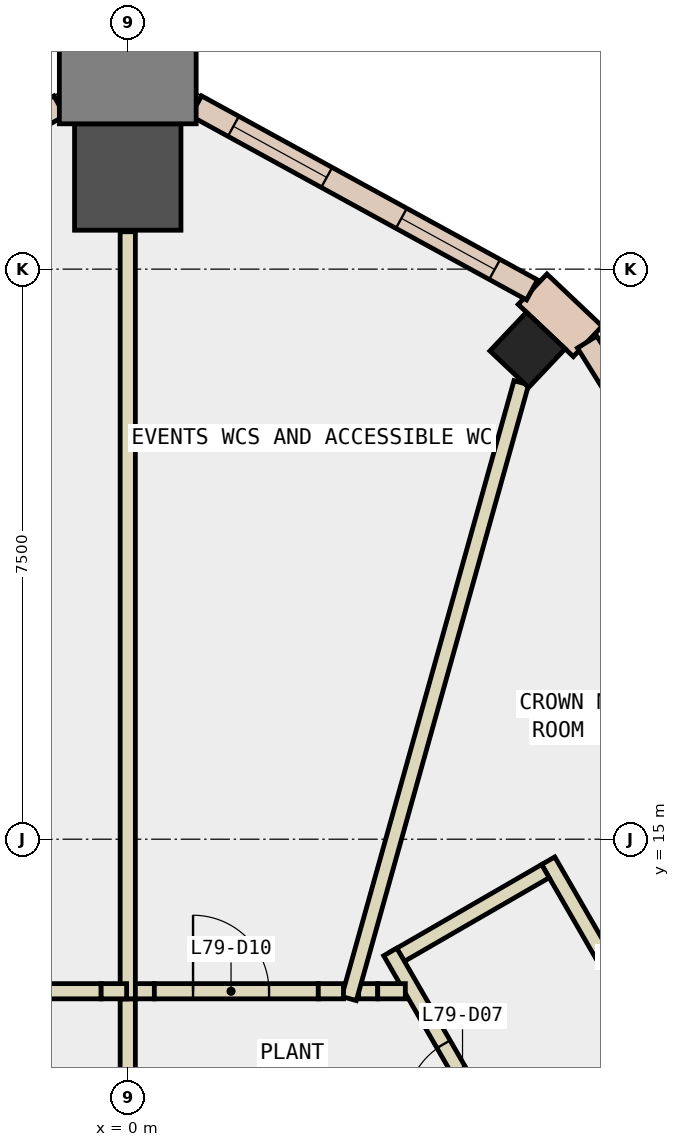
"""IFC4 building model, lengths in metres.
Left out: names, types, materials, properties, quantities, classifications, styles, units other than length and angle.
Written with IfcOpenShell. Run it as: python <this file> out.ifc"""

import sys

from ifc_helpers import new_model, si_unit, direction, frame, frame_2d, origin, origin_2d, place, context, subcontext, project, spatial, rectangle, extrude, element, fill, save


model = new_model("IFC4")
c1 = context("Model", 3, precision=1e-05, world=origin(), true_north=direction((0.0, 1.0)))
c2 = subcontext(c1, "Body", "Model", "MODEL_VIEW")
j1 = project(units=[si_unit("LENGTHUNIT", "METRE"), si_unit("PLANEANGLEUNIT", "RADIAN")], contexts=[c1])
p1 = place(None, origin())
s1 = spatial("IfcSite", under=j1, at=p1, CompositionType="ELEMENT")
p2 = place(p1, origin())
s2 = spatial("IfcBuilding", under=s1, at=p2, CompositionType="ELEMENT")
p3 = place(p2, frame((0.0, 0.0, 335.9)))
s3 = spatial("IfcBuildingStorey", under=s2, at=p3, CompositionType="ELEMENT", Elevation=335.9)
p4 = place(p3, frame((5.26, 21.438, -0.35), z_axis=(0.0, 0.0, 1.0), x_axis=(-0.726658609123, 0.686998737835, 0.0)))
e1 = element("IfcColumn", 1, at=p4, inside=s3, PredefinedType="COLUMN", context=c2, shape_type="SweptSolid", body=[
    extrude(rectangle(XDim=0.7, YDim=0.7, at=origin_2d()), origin(), (0.0, 0.0, 1.0), 4.4),
])
p5 = place(p3, frame((0.0, 23.712, -0.35), z_axis=(0.0, 0.0, 1.0), x_axis=(0.0, 1.0, 0.0)))
e2 = element("IfcColumn", 2, at=p5, inside=s3, PredefinedType="COLUMN", context=c2, shape_type="SweptSolid", body=[
    extrude(rectangle(XDim=1.4, YDim=1.4, at=origin_2d()), origin(), (0.0, 0.0, 1.0), 4.4),
])
p6 = place(p3, frame((0.0, 25.312, -0.35), z_axis=(0.0, 0.0, 1.0), x_axis=(0.0, 1.0, 0.0)))
e3 = element("IfcColumn", 3, at=p6, inside=s3, PredefinedType="COLUMN", context=c2, shape_type="SweptSolid", body=[
    extrude(rectangle(XDim=1.8, YDim=1.8, at=origin_2d()), origin(), (0.0, 0.0, 1.0), 4.4),
])
p7 = place(p3, frame((6.052, 21.549, 0.0), z_axis=(0.0, 0.0, 1.0), x_axis=(-0.726376136967, 0.687297393888, 0.0)))
e4 = element("IfcWall", 4, at=p7, inside=s3, PredefinedType="STANDARD", context=c2, shape_type="SweptSolid", body=[
    extrude(rectangle(XDim=1.0, YDim=0.55, at=frame_2d((0.5, 0.0))), origin(), (0.0, 0.0, 1.0), 4.05),
])
p8 = place(p3, frame((9.769, 15.564, 0.0), z_axis=(0.0, 0.0, 1.0), x_axis=(-0.528920387505, 0.848671446251, 0.0)))
e5 = element("IfcWall", 5, at=p8, inside=s3, PredefinedType="STANDARD", context=c2, shape_type="SweptSolid", body=[
    extrude(rectangle(XDim=7.043, YDim=0.3, at=frame_2d((3.521, 0.0))), origin(), (0.0, 0.0, 1.0), 4.05),
])
p9 = place(p8, frame((0.561, 0.0, 0.9)))
e6 = element("IfcOpeningElement", 6, at=p9, cuts=e5, PredefinedType="OPENING", context=c2, shape_type="SweptSolid", body=[
    extrude(rectangle(XDim=2.4, YDim=3.0, at=frame_2d((1.2, 1.5))), frame((0.0, 0.16, 0.0), z_axis=(0.0, -1.0, 0.0), x_axis=(1.0, 0.0, 0.0)), (0.0, 0.0, 1.0), 0.32),
])
p10 = place(p8, frame((4.082, 0.0, 0.9)))
e7 = element("IfcOpeningElement", 7, at=p10, cuts=e5, PredefinedType="OPENING", context=c2, shape_type="SweptSolid", body=[
    extrude(rectangle(XDim=2.4, YDim=3.0, at=frame_2d((1.2, 1.5))), frame((0.0, 0.16, 0.0), z_axis=(0.0, -1.0, 0.0), x_axis=(1.0, 0.0, 0.0)), (0.0, 0.0, 1.0), 0.32),
])
p11 = place(p3, frame((5.319, 22.227, 0.0), z_axis=(0.0, 0.0, 1.0), x_axis=(-0.877068569324, 0.480365199305, 0.0)))
e8 = element("IfcWall", 8, at=p11, inside=s3, PredefinedType="STANDARD", context=c2, shape_type="SweptSolid", body=[
    extrude(rectangle(XDim=5.04, YDim=0.3, at=frame_2d((2.52, 0.0))), origin(), (0.0, 0.0, 1.0), 4.05),
])
p12 = place(p11, frame((0.56, 0.0, 0.9)))
e9 = element("IfcOpeningElement", 9, at=p12, cuts=e8, PredefinedType="OPENING", context=c2, shape_type="SweptSolid", body=[
    extrude(rectangle(XDim=1.4, YDim=3.0, at=frame_2d((0.7, 1.5))), frame((0.0, 0.16, 0.0), z_axis=(0.0, -1.0, 0.0), x_axis=(1.0, 0.0, 0.0)), (0.0, 0.0, 1.0), 0.32),
])
p13 = place(p11, frame((3.08, 0.0, 0.9)))
e10 = element("IfcOpeningElement", 10, at=p13, cuts=e8, PredefinedType="OPENING", context=c2, shape_type="SweptSolid", body=[
    extrude(rectangle(XDim=1.4, YDim=3.0, at=frame_2d((0.7, 1.5))), frame((0.0, 0.16, 0.0), z_axis=(0.0, -1.0, 0.0), x_axis=(1.0, 0.0, 0.0)), (0.0, 0.0, 1.0), 0.32),
])
p14 = place(p3, frame((-0.899, 24.648, 0.0), z_axis=(0.0, 0.0, 1.0), x_axis=(-0.877068569324, -0.480365199305, 0.0)))
e11 = element("IfcWall", 11, at=p14, inside=s3, PredefinedType="STANDARD", context=c2, shape_type="SweptSolid", body=[
    extrude(rectangle(XDim=5.04, YDim=0.3, at=frame_2d((2.52, 0.0))), origin(), (0.0, 0.0, 1.0), 4.05),
])
p15 = place(p14, frame((0.56, 0.0, 0.9)))
e12 = element("IfcOpeningElement", 12, at=p15, cuts=e11, PredefinedType="OPENING", context=c2, shape_type="SweptSolid", body=[
    extrude(rectangle(XDim=1.4, YDim=3.0, at=frame_2d((0.7, 1.5))), frame((0.0, 0.16, 0.0), z_axis=(0.0, -1.0, 0.0), x_axis=(1.0, 0.0, 0.0)), (0.0, 0.0, 1.0), 0.32),
])
p16 = place(p14, frame((3.08, 0.0, 0.9)))
e13 = element("IfcOpeningElement", 13, at=p16, cuts=e11, PredefinedType="OPENING", context=c2, shape_type="SweptSolid", body=[
    extrude(rectangle(XDim=1.4, YDim=3.0, at=frame_2d((0.7, 1.5))), frame((0.0, 0.16, 0.0), z_axis=(0.0, -1.0, 0.0), x_axis=(1.0, 0.0, 0.0)), (0.0, 0.0, 1.0), 0.32),
])
p17 = place(p3, frame((5.532, 14.717, 0.0), z_axis=(0.0, 0.0, 1.0), x_axis=(0.499955822529, -0.866050908157, 0.0)))
e14 = element("IfcWall", 14, at=p17, inside=s3, PredefinedType="PARTITIONING", context=c2, shape_type="SweptSolid", body=[
    extrude(rectangle(XDim=2.958, YDim=0.2, at=frame_2d((1.479, 0.0))), origin(), (0.0, 0.0, 1.0), 4.05),
])
p18 = place(p17, frame((1.88, 0.0, 0.0)))
e15 = element("IfcOpeningElement", 15, at=p18, cuts=e14, PredefinedType="OPENING", context=c2, shape_type="SweptSolid", body=[
    extrude(rectangle(XDim=1.0, YDim=2.1, at=frame_2d((0.5, 1.05))), frame((0.0, 0.11, 0.0), z_axis=(0.0, -1.0, 0.0), x_axis=(1.0, 0.0, 0.0)), (0.0, 0.0, 1.0), 0.22),
])
p19 = place(p3, frame((3.504, 13.43, 0.0), z_axis=(0.0, 0.0, 1.0), x_axis=(0.865927408828, 0.500169693844, 0.0)))
e16 = element("IfcWall", 16, at=p19, inside=s3, PredefinedType="PARTITIONING", context=c2, shape_type="SweptSolid", body=[
    extrude(rectangle(XDim=2.3, YDim=0.2, at=frame_2d((1.15, 0.0))), origin(), (0.0, 0.0, 1.0), 4.05),
])
p20 = place(p3, frame((3.038, 13.0, 0.0), z_axis=(0.0, 0.0, 1.0), x_axis=(1.0, 0.0, 0.0)))
e17 = element("IfcWall", 17, at=p20, inside=s3, PredefinedType="PARTITIONING", context=c2, shape_type="SweptSolid", body=[
    extrude(rectangle(XDim=0.251, YDim=0.2, at=frame_2d((0.125, 0.0))), origin(), (0.0, 0.0, 1.0), 1.95),
])
p21 = place(p3, frame((0.015, 13.0, 0.0), z_axis=(0.0, 0.0, 1.0), x_axis=(1.0, 0.0, 0.0)))
e18 = element("IfcWall", 18, at=p21, inside=s3, PredefinedType="PARTITIONING", context=c2, shape_type="SweptSolid", body=[
    extrude(rectangle(XDim=0.335, YDim=0.2, at=frame_2d((0.167, 0.0))), origin(), (0.0, 0.0, 1.0), 1.95),
])
p22 = place(p3, frame((0.0, 11.0, 0.0), z_axis=(0.0, 0.0, 1.0), x_axis=(0.0, 1.0, 0.0)))
e19 = element("IfcWall", 19, at=p22, inside=s3, PredefinedType="PARTITIONING", context=c2, shape_type="SweptSolid", body=[
    extrude(rectangle(XDim=1.9, YDim=0.2, at=frame_2d((0.95, 0.0))), origin(), (0.0, 0.0, 1.0), 1.95),
])
p23 = place(p3, frame((2.911, 12.904, 0.0), z_axis=(0.0, 0.0, 1.0), x_axis=(0.269466315524, 0.963009815525, 0.0)))
e20 = element("IfcWall", 20, at=p23, inside=s3, PredefinedType="PARTITIONING", context=c2, shape_type="SweptSolid", body=[
    extrude(rectangle(XDim=8.413, YDim=0.2, at=frame_2d((4.207, 0.0))), origin(), (0.0, 0.0, 1.0), 1.95),
])
p24 = place(p3, frame((0.0, 12.9, 0.0), z_axis=(0.0, 0.0, 1.0), x_axis=(0.0, 1.0, 0.0)))
e21 = element("IfcWall", 21, at=p24, inside=s3, PredefinedType="PARTITIONING", context=c2, shape_type="SweptSolid", body=[
    extrude(rectangle(XDim=10.092, YDim=0.2, at=frame_2d((5.046, 0.0))), origin(), (0.0, 0.0, 1.0), 1.95),
])
p25 = place(p3, frame((4.822, 11.147, 0.0), z_axis=(0.0, 0.0, 1.0), x_axis=(-0.499871764879, 0.866099427708, 0.0)))
e22 = element("IfcWall", 22, at=p25, inside=s3, PredefinedType="PARTITIONING", context=c2, shape_type="SweptSolid", body=[
    extrude(rectangle(XDim=2.737, YDim=0.2, at=frame_2d((1.368, 0.0))), origin(), (0.0, 0.0, 1.0), 4.05),
])
p26 = place(p25, frame((0.335, 0.0, 0.0)))
e23 = element("IfcOpeningElement", 23, at=p26, cuts=e22, PredefinedType="OPENING", context=c2, shape_type="SweptSolid", body=[
    extrude(rectangle(XDim=1.0, YDim=2.1, at=frame_2d((0.5, 1.05))), frame((0.0, 0.11, 0.0), z_axis=(0.0, -1.0, 0.0), x_axis=(1.0, 0.0, 0.0)), (0.0, 0.0, 1.0), 0.22),
])
p27 = place(p3, frame((3.289, 13.0, 0.0), z_axis=(0.0, 0.0, 1.0), x_axis=(1.0, 0.0, 0.0)))
e24 = element("IfcWall", 24, at=p27, inside=s3, PredefinedType="PARTITIONING", context=c2, shape_type="SweptSolid", body=[
    extrude(rectangle(XDim=0.363, YDim=0.2, at=frame_2d((0.182, 0.0))), origin(), (0.0, 0.0, 1.0), 4.05),
])
p28 = place(p3, frame((0.35, 13.0, 0.0), z_axis=(0.0, 0.0, 1.0), x_axis=(1.0, 0.0, 0.0)))
e25 = element("IfcWall", 25, at=p28, inside=s3, PredefinedType="PARTITIONING", context=c2, shape_type="SweptSolid", body=[
    extrude(rectangle(XDim=2.157, YDim=0.2, at=frame_2d((1.079, 0.0))), origin(), (0.0, 0.0, 1.0), 4.05),
])
p29 = place(p28, frame((0.509, 0.0, 0.0)))
e26 = element("IfcOpeningElement", 26, at=p29, cuts=e25, PredefinedType="OPENING", context=c2, shape_type="SweptSolid", body=[
    extrude(rectangle(XDim=1.0, YDim=2.1, at=frame_2d((0.5, 1.05))), frame((0.0, 0.11, 0.0), z_axis=(0.0, -1.0, 0.0), x_axis=(1.0, 0.0, 0.0)), (0.0, 0.0, 1.0), 0.22),
])
p30 = place(p3, frame((2.507, 13.0, 0.0), z_axis=(0.0, 0.0, 1.0), x_axis=(1.0, 0.0, 0.0)))
e27 = element("IfcWall", 27, at=p30, inside=s3, PredefinedType="PARTITIONING", context=c2, shape_type="SweptSolid", body=[
    extrude(rectangle(XDim=0.331, YDim=0.2, at=frame_2d((0.166, 0.0))), origin(), (0.0, 0.0, 1.0), 1.95),
])
p31 = place(p3, frame((-2.507, 13.0, 0.0), z_axis=(0.0, 0.0, 1.0), x_axis=(1.0, 0.0, 0.0)))
e28 = element("IfcWall", 28, at=p31, inside=s3, PredefinedType="PARTITIONING", context=c2, shape_type="SweptSolid", body=[
    extrude(rectangle(XDim=2.157, YDim=0.2, at=frame_2d((1.079, 0.0))), origin(), (0.0, 0.0, 1.0), 4.05),
])
p32 = place(p3, frame((-0.35, 13.0, 0.0), z_axis=(0.0, 0.0, 1.0), x_axis=(1.0, 0.0, 0.0)))
e29 = element("IfcWall", 29, at=p32, inside=s3, PredefinedType="PARTITIONING", context=c2, shape_type="SweptSolid", body=[
    extrude(rectangle(XDim=0.335, YDim=0.2, at=frame_2d((0.167, 0.0))), origin(), (0.0, 0.0, 1.0), 1.95),
])
p33 = place(p12, origin())
e30 = element("IfcWindow", 30, at=p33, inside=s3, PartitioningType="SINGLE_PANEL", PredefinedType="WINDOW", context=c2, shape_type="SweptSolid", body=[
    extrude(rectangle(XDim=1.4, YDim=3.0, at=frame_2d((0.7, 1.5))), frame((0.0, 0.03, 0.0), z_axis=(0.0, -1.0, 0.0), x_axis=(1.0, 0.0, 0.0)), (0.0, 0.0, 1.0), 0.06),
])
fill(e9, e30)
p34 = place(p13, origin())
e31 = element("IfcWindow", 31, at=p34, inside=s3, PartitioningType="SINGLE_PANEL", PredefinedType="WINDOW", context=c2, shape_type="SweptSolid", body=[
    extrude(rectangle(XDim=1.4, YDim=3.0, at=frame_2d((0.7, 1.5))), frame((0.0, 0.03, 0.0), z_axis=(0.0, -1.0, 0.0), x_axis=(1.0, 0.0, 0.0)), (0.0, 0.0, 1.0), 0.06),
])
fill(e10, e31)
p35 = place(p26, origin())
e32 = element("IfcDoor", 32, at=p35, inside=s3, OperationType="SINGLE_SWING_RIGHT", PredefinedType="DOOR", context=c2, shape_type="SweptSolid", body=[
    extrude(rectangle(XDim=1.0, YDim=2.1, at=frame_2d((0.5, 1.05))), frame((0.0, 0.025, 0.0), z_axis=(0.0, -1.0, 0.0), x_axis=(1.0, 0.0, 0.0)), (0.0, 0.0, 1.0), 0.05),
])
fill(e23, e32)
p36 = place(p29, origin())
e33 = element("IfcDoor", 33, at=p36, inside=s3, OperationType="SINGLE_SWING_LEFT", PredefinedType="DOOR", context=c2, shape_type="SweptSolid", body=[
    extrude(rectangle(XDim=1.0, YDim=2.1, at=frame_2d((0.5, 1.05))), frame((0.0, 0.025, 0.0), z_axis=(0.0, -1.0, 0.0), x_axis=(1.0, 0.0, 0.0)), (0.0, 0.0, 1.0), 0.05),
])
fill(e26, e33)
save(model, sys.argv[1])
